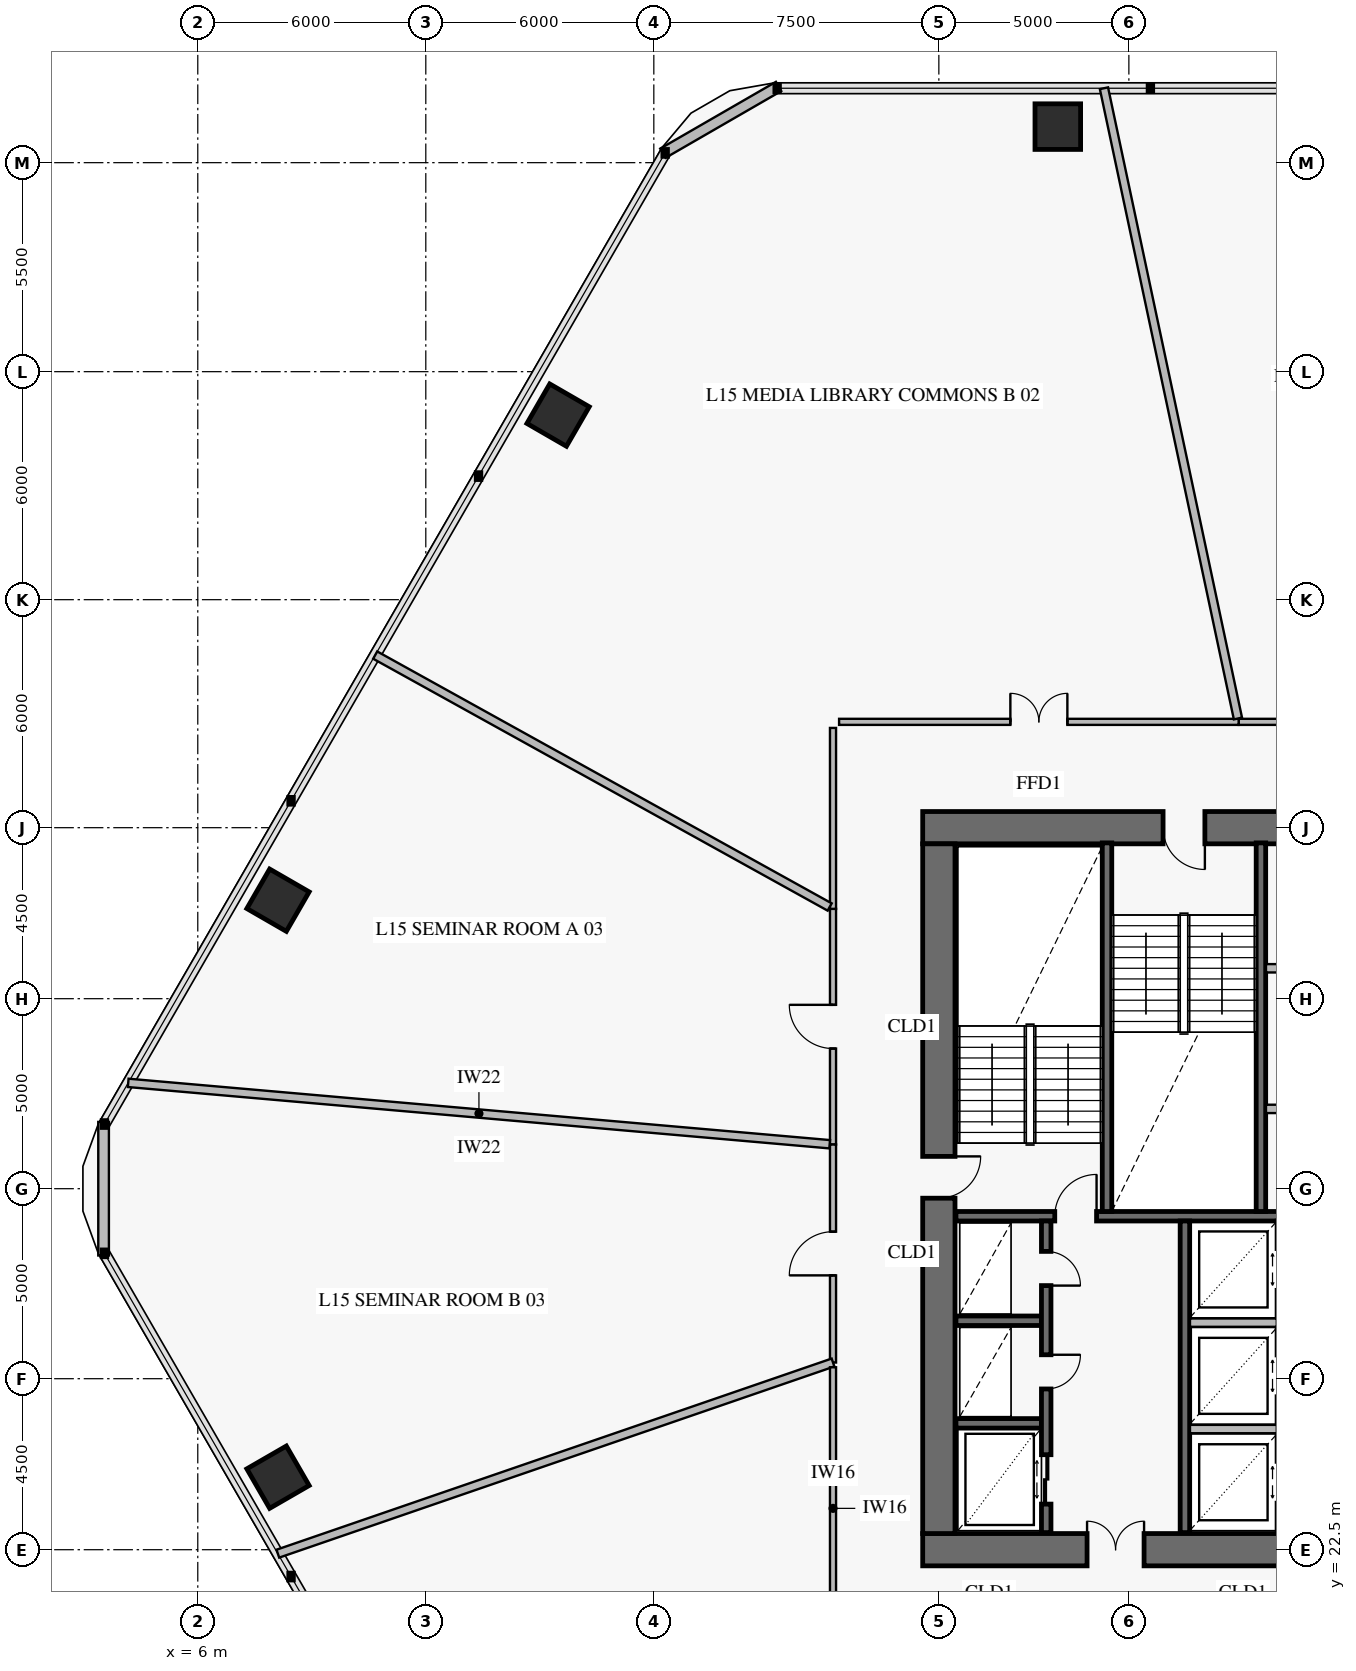
"""IFC4 building model, lengths in metres.
Left out: names, types, materials, properties, quantities, classifications, styles, units other than length and angle.
Written with IfcOpenShell. Run it as: python <this file> out.ifc"""

import sys

from ifc_helpers import new_model, si_unit, direction, frame, frame_2d, origin, origin_2d, place, context, subcontext, project, spatial, rectangle, extrude, element, fill, save


model = new_model("IFC4")
c1 = context("Model", 3, precision=1e-05, world=origin(), true_north=direction((0.0, 1.0)))
c2 = subcontext(c1, "Body", "Model", "MODEL_VIEW")
j1 = project(units=[si_unit("LENGTHUNIT", "METRE"), si_unit("PLANEANGLEUNIT", "RADIAN")], contexts=[c1])
p1 = place(None, origin())
s1 = spatial("IfcSite", under=j1, at=p1, CompositionType="ELEMENT")
p2 = place(p1, origin())
s2 = spatial("IfcBuilding", under=s1, at=p2, CompositionType="ELEMENT")
p3 = place(p2, frame((0.0, 0.0, 62.4)))
s3 = spatial("IfcBuildingStorey", under=s2, at=p3, CompositionType="ELEMENT", Elevation=62.4)
p4 = place(p3, frame((25.075, 22.5, 0.0), z_axis=(0.0, 0.0, 1.0), x_axis=(1.0, 0.0, 0.0)))
e1 = element("IfcWall", 1, at=p4, inside=s3, PredefinedType="SHEAR", context=c2, shape_type="SweptSolid", body=[
    extrude(rectangle(XDim=9.975, YDim=0.85, at=frame_2d((4.988, 0.0))), origin(), (0.0, 0.0, 1.0), 4.2),
])
p5 = place(p4, frame((4.325, 0.0, 0.0)))
e2 = element("IfcOpeningElement", 2, at=p5, cuts=e1, PredefinedType="OPENING", context=c2, shape_type="SweptSolid", body=[
    extrude(rectangle(XDim=1.5, YDim=2.15, at=frame_2d((0.75, 1.075))), frame((0.0, 0.437, 0.0), z_axis=(0.0, -1.0, 0.0), x_axis=(1.0, 0.0, 0.0)), (0.0, 0.0, 1.0), 0.874),
])
p6 = place(p3, frame((36.75, 41.5, 0.0), z_axis=(0.0, 0.0, 1.0), x_axis=(-1.0, 0.0, 0.0)))
e3 = element("IfcWall", 3, at=p6, inside=s3, PredefinedType="SHEAR", context=c2, shape_type="SweptSolid", body=[
    extrude(rectangle(XDim=11.675, YDim=0.85, at=frame_2d((5.837, 0.0))), origin(), (0.0, 0.0, 1.0), 4.2),
])
p7 = place(p6, frame((4.25, 0.0, 0.0)))
e4 = element("IfcOpeningElement", 4, at=p7, cuts=e3, PredefinedType="OPENING", context=c2, shape_type="SweptSolid", body=[
    extrude(rectangle(XDim=1.1, YDim=2.15, at=frame_2d((0.55, 1.075))), frame((0.0, 0.437, 0.0), z_axis=(0.0, -1.0, 0.0), x_axis=(1.0, 0.0, 0.0)), (0.0, 0.0, 1.0), 0.874),
])
p8 = place(p3, frame((25.5, 22.925, 0.0), z_axis=(0.0, 0.0, 1.0), x_axis=(0.0, 1.0, 0.0)))
e5 = element("IfcWall", 5, at=p8, inside=s3, PredefinedType="SHEAR", context=c2, shape_type="SweptSolid", body=[
    extrude(rectangle(XDim=18.15, YDim=0.85, at=frame_2d((9.075, 0.0))), origin(), (0.0, 0.0, 1.0), 4.2),
])
p9 = place(p8, frame((8.825, 0.0, 0.0)))
e6 = element("IfcOpeningElement", 6, at=p9, cuts=e5, PredefinedType="OPENING", context=c2, shape_type="SweptSolid", body=[
    extrude(rectangle(XDim=1.1, YDim=2.15, at=frame_2d((0.55, 1.075))), frame((0.0, 0.437, 0.0), z_axis=(0.0, -1.0, 0.0), x_axis=(1.0, 0.0, 0.0)), (0.0, 0.0, 1.0), 0.874),
])
for number, where, z_axis, x_axis in (
    (7, (28.63, 59.948, 0.0), (0.0, 0.0, 1.0), (-1.0, 0.0, 0.0)),
    (8, (15.481, 52.357, 0.0), (0.0, 0.0, 1.0), (-0.5, -0.866, 0.0)),
    (9, (8.111, 39.592, 0.0), (0.0, 0.0, 1.0), (-0.5, -0.866, 0.0)),
    (10, (8.111, 24.408, 0.0), (0.0, 0.0, 1.0), (0.5, -0.866, 0.0)),
):
    element("IfcColumn", number, at=place(p3, frame(where, z_axis=z_axis, x_axis=x_axis)), inside=s3, PredefinedType="COLUMN", context=c2, shape_type="SweptSolid", body=[
        extrude(rectangle(XDim=1.2, YDim=1.2, at=origin_2d()), origin(), (0.0, 0.0, 1.0), 3.92),
    ])
p10 = place(p3, frame((3.521, 30.242, 0.0), z_axis=(0.0, 0.0, 1.0), x_axis=(0.0, 1.0, 0.0)))
e11 = element("IfcWall", 11, at=p10, inside=s3, PredefinedType="SOLIDWALL", context=c2, shape_type="SweptSolid", body=[
    extrude(rectangle(XDim=3.515, YDim=0.28, at=frame_2d((1.758, 0.0))), origin(), (0.0, 0.0, 1.0), 3.92),
])
p11 = place(p3, frame((18.239, 59.249, 0.0), z_axis=(0.0, 0.0, 1.0), x_axis=(0.866007452331, 0.500031091541, 0.0)))
e12 = element("IfcWall", 12, at=p11, inside=s3, PredefinedType="SOLIDWALL", context=c2, shape_type="SweptSolid", body=[
    extrude(rectangle(XDim=3.515, YDim=0.28, at=frame_2d((1.757, 0.0))), origin(), (0.0, 0.0, 1.0), 3.92),
])
p12 = place(p3, frame((25.95, 31.275, 0.0), z_axis=(0.0, 0.0, 1.0), x_axis=(1.0, 0.0, 0.0)))
e13 = element("IfcWall", 13, at=p12, inside=s3, PredefinedType="SOLIDWALL", context=c2, shape_type="SweptSolid", body=[
    extrude(rectangle(XDim=20.1, YDim=0.25, at=frame_2d((10.05, 0.0))), origin(), (0.0, 0.0, 1.0), 4.2),
])
p13 = place(p12, frame((2.6, 0.0, 0.0)))
e14 = element("IfcOpeningElement", 14, at=p13, cuts=e13, PredefinedType="OPENING", context=c2, shape_type="SweptSolid", body=[
    extrude(rectangle(XDim=1.1, YDim=2.15, at=frame_2d((0.55, 1.075))), frame((0.0, 0.137, 0.0), z_axis=(0.0, -1.0, 0.0), x_axis=(1.0, 0.0, 0.0)), (0.0, 0.0, 1.0), 0.274),
])
p14 = place(p12, frame((10.6, 0.0, 0.0)))
e15 = element("IfcOpeningElement", 15, at=p14, cuts=e13, PredefinedType="OPENING", context=c2, shape_type="SweptSolid", body=[
    extrude(rectangle(XDim=1.1, YDim=2.15, at=frame_2d((0.55, 1.075))), frame((0.0, 0.137, 0.0), z_axis=(0.0, -1.0, 0.0), x_axis=(1.0, 0.0, 0.0)), (0.0, 0.0, 1.0), 0.274),
])
p15 = place(p12, frame((16.35, 0.0, 0.0)))
e16 = element("IfcOpeningElement", 16, at=p15, cuts=e13, PredefinedType="OPENING", context=c2, shape_type="SweptSolid", body=[
    extrude(rectangle(XDim=1.1, YDim=2.15, at=frame_2d((0.55, 1.075))), frame((0.0, 0.137, 0.0), z_axis=(0.0, -1.0, 0.0), x_axis=(1.0, 0.0, 0.0)), (0.0, 0.0, 1.0), 0.274),
])
for number, where, z_axis, x_axis in (
    (17, (29.925, 31.4, 0.0), (0.0, 0.0, 1.0), (0.0, 1.0, 0.0)),
    (18, (33.975, 31.4, 0.0), (0.0, 0.0, 1.0), (0.0, 1.0, 0.0)),
):
    element("IfcWall", number, at=place(p3, frame(where, z_axis=z_axis, x_axis=x_axis)), inside=s3, PredefinedType="SOLIDWALL", context=c2, shape_type="SweptSolid", body=[
        extrude(rectangle(XDim=9.7, YDim=0.25, at=frame_2d((4.85, 0.0))), origin(), (0.0, 0.0, 1.0), 4.2),
    ])
for number, where, z_axis, x_axis in (
    (19, (25.95, 25.825, 0.0), (0.0, 0.0, 1.0), (1.0, 0.0, 0.0)),
    (20, (25.95, 28.525, 0.0), (0.0, 0.0, 1.0), (1.0, 0.0, 0.0)),
):
    element("IfcWall", number, at=place(p3, frame(where, z_axis=z_axis, x_axis=x_axis)), inside=s3, PredefinedType="SOLIDWALL", context=c2, shape_type="SweptSolid", body=[
        extrude(rectangle(XDim=2.25, YDim=0.25, at=frame_2d((1.125, 0.0))), origin(), (0.0, 0.0, 1.0), 4.2),
    ])
p16 = place(p3, frame((28.325, 22.95, 0.0), z_axis=(0.0, 0.0, 1.0), x_axis=(0.0, 1.0, 0.0)))
e21 = element("IfcWall", 21, at=p16, inside=s3, PredefinedType="SOLIDWALL", context=c2, shape_type="SweptSolid", body=[
    extrude(rectangle(XDim=8.2, YDim=0.25, at=frame_2d((4.1, 0.0))), origin(), (0.0, 0.0, 1.0), 4.2),
])
p17 = place(p16, frame((0.75, 0.0, 0.0)))
e22 = element("IfcOpeningElement", 22, at=p17, cuts=e21, PredefinedType="OPENING", context=c2, shape_type="SweptSolid", body=[
    extrude(rectangle(XDim=1.3, YDim=2.3, at=frame_2d((0.65, 1.15))), frame((0.0, 0.137, 0.0), z_axis=(0.0, -1.0, 0.0), x_axis=(1.0, 0.0, 0.0)), (0.0, 0.0, 1.0), 0.274),
])
p18 = place(p16, frame((3.78, 0.0, 0.0)))
e23 = element("IfcOpeningElement", 23, at=p18, cuts=e21, PredefinedType="OPENING", context=c2, shape_type="SweptSolid", body=[
    extrude(rectangle(XDim=0.9, YDim=2.1, at=frame_2d((0.45, 1.05))), frame((0.0, 0.137, 0.0), z_axis=(0.0, -1.0, 0.0), x_axis=(1.0, 0.0, 0.0)), (0.0, 0.0, 1.0), 0.274),
])
p19 = place(p16, frame((6.5, 0.0, 0.0)))
e24 = element("IfcOpeningElement", 24, at=p19, cuts=e21, PredefinedType="OPENING", context=c2, shape_type="SweptSolid", body=[
    extrude(rectangle(XDim=0.9, YDim=2.1, at=frame_2d((0.45, 1.05))), frame((0.0, 0.137, 0.0), z_axis=(0.0, -1.0, 0.0), x_axis=(1.0, 0.0, 0.0)), (0.0, 0.0, 1.0), 0.274),
])
p20 = place(p3, frame((31.975, 22.95, 0.0), z_axis=(0.0, 0.0, 1.0), x_axis=(0.0, 1.0, 0.0)))
e25 = element("IfcWall", 25, at=p20, inside=s3, PredefinedType="SOLIDWALL", context=c2, shape_type="SweptSolid", body=[
    extrude(rectangle(XDim=8.2, YDim=0.25, at=frame_2d((4.1, 0.0))), origin(), (0.0, 0.0, 1.0), 4.2),
])
p21 = place(p3, frame((45.257, 44.285, 0.0), z_axis=(0.0, 0.0, 1.0), x_axis=(-1.0, 0.0, 0.0)))
e26 = element("IfcWall", 26, at=p21, inside=s3, PredefinedType="PARTITIONING", context=c2, shape_type="SweptSolid", body=[
    extrude(rectangle(XDim=11.869, YDim=0.16, at=frame_2d((5.934, 0.0))), origin(), (0.0, 0.0, 1.0), 3.22),
])
p22 = place(p21, frame((5.184, 0.0, 0.0)))
e27 = element("IfcOpeningElement", 27, at=p22, cuts=e26, PredefinedType="OPENING", context=c2, shape_type="SweptSolid", body=[
    extrude(rectangle(XDim=1.5, YDim=2.15, at=frame_2d((0.75, 1.075))), frame((0.0, 0.092, 0.0), z_axis=(0.0, -1.0, 0.0), x_axis=(1.0, 0.0, 0.0)), (0.0, 0.0, 1.0), 0.184),
])
p23 = place(p3, frame((33.389, 44.285, 0.0), z_axis=(0.0, 0.0, 1.0), x_axis=(-1.0, 0.0, 0.0)))
e28 = element("IfcWall", 28, at=p23, inside=s3, PredefinedType="PARTITIONING", context=c2, shape_type="SweptSolid", body=[
    extrude(rectangle(XDim=10.514, YDim=0.16, at=frame_2d((5.257, 0.0))), origin(), (0.0, 0.0, 1.0), 3.22),
])
p24 = place(p23, frame((4.507, 0.0, 0.0)))
e29 = element("IfcOpeningElement", 29, at=p24, cuts=e28, PredefinedType="OPENING", context=c2, shape_type="SweptSolid", body=[
    extrude(rectangle(XDim=1.5, YDim=2.15, at=frame_2d((0.75, 1.075))), frame((0.0, 0.092, 0.0), z_axis=(0.0, -1.0, 0.0), x_axis=(1.0, 0.0, 0.0)), (0.0, 0.0, 1.0), 0.184),
])
p25 = place(p3, frame((22.715, 39.364, 0.0), z_axis=(0.0, 0.0, 1.0), x_axis=(0.0, -1.0, 0.0)))
e30 = element("IfcWall", 30, at=p25, inside=s3, PredefinedType="PARTITIONING", context=c2, shape_type="SweptSolid", body=[
    extrude(rectangle(XDim=6.202, YDim=0.16, at=frame_2d((3.101, 0.0))), origin(), (0.0, 0.0, 1.0), 3.22),
])
p26 = place(p25, frame((2.526, 0.0, 0.0)))
e31 = element("IfcOpeningElement", 31, at=p26, cuts=e30, PredefinedType="OPENING", context=c2, shape_type="SweptSolid", body=[
    extrude(rectangle(XDim=1.15, YDim=2.2, at=frame_2d((0.575, 1.1))), frame((0.0, 0.092, 0.0), z_axis=(0.0, -1.0, 0.0), x_axis=(1.0, 0.0, 0.0)), (0.0, 0.0, 1.0), 0.184),
])
p27 = place(p3, frame((22.715, 33.162, 0.0), z_axis=(0.0, 0.0, 1.0), x_axis=(0.0, -1.0, 0.0)))
e32 = element("IfcWall", 32, at=p27, inside=s3, PredefinedType="PARTITIONING", context=c2, shape_type="SweptSolid", body=[
    extrude(rectangle(XDim=5.737, YDim=0.16, at=frame_2d((2.868, 0.0))), origin(), (0.0, 0.0, 1.0), 3.22),
])
p28 = place(p27, frame((2.293, 0.0, 0.0)))
e33 = element("IfcOpeningElement", 33, at=p28, cuts=e32, PredefinedType="OPENING", context=c2, shape_type="SweptSolid", body=[
    extrude(rectangle(XDim=1.15, YDim=2.2, at=frame_2d((0.575, 1.1))), frame((0.0, 0.092, 0.0), z_axis=(0.0, -1.0, 0.0), x_axis=(1.0, 0.0, 0.0)), (0.0, 0.0, 1.0), 0.184),
])
for number, where, z_axis, x_axis in (
    (34, (34.108, 34.1, 0.0), (0.0, 0.0, 1.0), (1.0, 0.0, 0.0)),
    (35, (34.108, 37.8, 0.0), (0.0, 0.0, 1.0), (1.0, 0.0, 0.0)),
):
    element("IfcWall", number, at=place(p3, frame(where, z_axis=z_axis, x_axis=x_axis)), inside=s3, PredefinedType="PARTITIONING", context=c2, shape_type="SweptSolid", body=[
        extrude(rectangle(XDim=2.084, YDim=0.22, at=frame_2d((1.042, 0.0))), origin(), (0.0, 0.0, 1.0), 3.92),
    ])
for number, where, z_axis, x_axis in (
    (36, (32.108, 25.675, 0.0), (0.0, 0.0, 1.0), (1.0, 0.0, 0.0)),
    (37, (32.108, 28.475, 0.0), (0.0, 0.0, 1.0), (1.0, 0.0, 0.0)),
):
    element("IfcWall", number, at=place(p3, frame(where, z_axis=z_axis, x_axis=x_axis)), inside=s3, PredefinedType="PARTITIONING", context=c2, shape_type="SweptSolid", body=[
        extrude(rectangle(XDim=2.284, YDim=0.22, at=frame_2d((1.142, 0.0))), origin(), (0.0, 0.0, 1.0), 3.92),
    ])
p29 = place(p3, frame((33.37, 44.373, 0.0), z_axis=(0.0, 0.0, 1.0), x_axis=(-0.207914205497, 0.978147066219, 0.0)))
e38 = element("IfcWall", 38, at=p29, inside=s3, PredefinedType="PARTITIONING", context=c2, shape_type="SweptSolid", body=[
    extrude(rectangle(XDim=16.956, YDim=0.22, at=frame_2d((8.478, 0.0))), origin(), (0.0, 0.0, 1.0), 3.17),
])
p30 = place(p3, frame((22.715, 44.125, 0.0), z_axis=(0.0, 0.0, 1.0), x_axis=(0.0, -1.0, 0.0)))
e39 = element("IfcWall", 39, at=p30, inside=s3, PredefinedType="PARTITIONING", context=c2, shape_type="SweptSolid", body=[
    extrude(rectangle(XDim=4.761, YDim=0.16, at=frame_2d((2.38, 0.0))), origin(), (0.0, 0.0, 1.0), 3.92),
])
p31 = place(p3, frame((22.627, 39.413, 0.0), z_axis=(0.0, 0.0, 1.0), x_axis=(-0.874620963666, 0.484807353405, 0.0)))
e40 = element("IfcWall", 40, at=p31, inside=s3, PredefinedType="PARTITIONING", context=c2, shape_type="SweptSolid", body=[
    extrude(rectangle(XDim=13.673, YDim=0.22, at=frame_2d((6.836, 0.0))), origin(), (0.0, 0.0, 1.0), 3.17),
])
p32 = place(p3, frame((22.627, 33.17, 0.0), z_axis=(0.0, 0.0, 1.0), x_axis=(-0.99619391773, 0.087164661858, 0.0)))
e41 = element("IfcWall", 41, at=p32, inside=s3, PredefinedType="PARTITIONING", context=c2, shape_type="SweptSolid", body=[
    extrude(rectangle(XDim=18.528, YDim=0.22, at=frame_2d((9.264, 0.0))), origin(), (0.0, 0.0, 1.0), 3.17),
])
p33 = place(p3, frame((22.715, 27.426, 0.0), z_axis=(0.0, 0.0, 1.0), x_axis=(-0.945519485553, -0.325565511746, 0.0)))
e42 = element("IfcWall", 42, at=p33, inside=s3, PredefinedType="PARTITIONING", context=c2, shape_type="SweptSolid", body=[
    extrude(rectangle(XDim=15.45, YDim=0.22, at=frame_2d((7.725, 0.0))), origin(), (0.0, 0.0, 1.0), 3.17),
])
p34 = place(p3, frame((22.715, 27.301, 0.0), z_axis=(0.0, 0.0, 1.0), x_axis=(0.0, -1.0, 0.0)))
e43 = element("IfcWall", 43, at=p34, inside=s3, PredefinedType="PARTITIONING", context=c2, shape_type="SweptSolid", body=[
    extrude(rectangle(XDim=7.426, YDim=0.16, at=frame_2d((3.713, 0.0))), origin(), (0.0, 0.0, 1.0), 3.92),
])
p35 = place(p9, frame((1.1, 0.0, 0.0), z_axis=(0.0, 0.0, 1.0), x_axis=(-1.0, 0.0, 0.0)))
e44 = element("IfcDoor", 44, at=p35, inside=s3, OperationType="SINGLE_SWING_LEFT", PredefinedType="USERDEFINED", context=c2, shape_type="SweptSolid", body=[
    extrude(rectangle(XDim=1.1, YDim=2.15, at=frame_2d((0.55, 1.075))), frame((0.0, 0.025, 0.0), z_axis=(0.0, -1.0, 0.0), x_axis=(1.0, 0.0, 0.0)), (0.0, 0.0, 1.0), 0.05),
])
fill(e6, e44)
p36 = place(p7, origin())
e45 = element("IfcDoor", 45, at=p36, inside=s3, OperationType="SINGLE_SWING_LEFT", PredefinedType="USERDEFINED", context=c2, shape_type="SweptSolid", body=[
    extrude(rectangle(XDim=1.1, YDim=2.15, at=frame_2d((0.55, 1.075))), frame((0.0, 0.025, 0.0), z_axis=(0.0, -1.0, 0.0), x_axis=(1.0, 0.0, 0.0)), (0.0, 0.0, 1.0), 0.05),
])
fill(e4, e45)
p37 = place(p5, origin())
e46 = element("IfcDoor", 46, at=p37, inside=s3, OperationType="DOUBLE_DOOR_SINGLE_SWING", PredefinedType="DOOR", context=c2, shape_type="SweptSolid", body=[
    extrude(rectangle(XDim=1.5, YDim=2.15, at=frame_2d((0.75, 1.075))), frame((0.0, 0.025, 0.0), z_axis=(0.0, -1.0, 0.0), x_axis=(1.0, 0.0, 0.0)), (0.0, 0.0, 1.0), 0.05),
])
fill(e2, e46)
p38 = place(p13, origin())
e47 = element("IfcDoor", 47, at=p38, inside=s3, OperationType="SINGLE_SWING_RIGHT", PredefinedType="USERDEFINED", context=c2, shape_type="SweptSolid", body=[
    extrude(rectangle(XDim=1.1, YDim=2.15, at=frame_2d((0.55, 1.075))), frame((0.0, 0.025, 0.0), z_axis=(0.0, -1.0, 0.0), x_axis=(1.0, 0.0, 0.0)), (0.0, 0.0, 1.0), 0.05),
])
fill(e14, e47)
p39 = place(p17, frame((1.3, 0.0, 0.0), z_axis=(0.0, 0.0, 1.0), x_axis=(-1.0, 0.0, 0.0)))
e48 = element("IfcDoor", 48, at=p39, inside=s3, OperationType="DOUBLE_DOOR_SLIDING", PredefinedType="DOOR", context=c2, shape_type="SweptSolid", body=[
    extrude(rectangle(XDim=1.3, YDim=2.3, at=frame_2d((0.65, 1.15))), frame((0.0, 0.025, 0.0), z_axis=(0.0, -1.0, 0.0), x_axis=(1.0, 0.0, 0.0)), (0.0, 0.0, 1.0), 0.05),
])
fill(e22, e48)
p40 = place(p18, frame((0.9, 0.0, 0.0), z_axis=(0.0, 0.0, 1.0), x_axis=(-1.0, 0.0, 0.0)))
e49 = element("IfcDoor", 49, at=p40, inside=s3, OperationType="SINGLE_SWING_LEFT", PredefinedType="DOOR", context=c2, shape_type="SweptSolid", body=[
    extrude(rectangle(XDim=0.9, YDim=2.1, at=frame_2d((0.45, 1.05))), frame((0.0, 0.025, 0.0), z_axis=(0.0, -1.0, 0.0), x_axis=(1.0, 0.0, 0.0)), (0.0, 0.0, 1.0), 0.05),
])
fill(e23, e49)
p41 = place(p19, frame((0.9, 0.0, 0.0), z_axis=(0.0, 0.0, 1.0), x_axis=(-1.0, 0.0, 0.0)))
e50 = element("IfcDoor", 50, at=p41, inside=s3, OperationType="SINGLE_SWING_RIGHT", PredefinedType="DOOR", context=c2, shape_type="SweptSolid", body=[
    extrude(rectangle(XDim=0.9, YDim=2.1, at=frame_2d((0.45, 1.05))), frame((0.0, 0.025, 0.0), z_axis=(0.0, -1.0, 0.0), x_axis=(1.0, 0.0, 0.0)), (0.0, 0.0, 1.0), 0.05),
])
fill(e24, e50)
p42 = place(p24, frame((1.5, 0.0, 0.0), z_axis=(0.0, 0.0, 1.0), x_axis=(-1.0, 0.0, 0.0)))
e51 = element("IfcDoor", 51, at=p42, inside=s3, OperationType="DOUBLE_DOOR_SINGLE_SWING", PredefinedType="DOOR", context=c2, shape_type="SweptSolid", body=[
    extrude(rectangle(XDim=1.5, YDim=2.15, at=frame_2d((0.75, 1.075))), frame((0.0, 0.025, 0.0), z_axis=(0.0, -1.0, 0.0), x_axis=(1.0, 0.0, 0.0)), (0.0, 0.0, 1.0), 0.05),
])
fill(e29, e51)
p43 = place(p26, frame((1.15, 0.0, 0.0), z_axis=(0.0, 0.0, 1.0), x_axis=(-1.0, 0.0, 0.0)))
e52 = element("IfcDoor", 52, at=p43, inside=s3, OperationType="SINGLE_SWING_RIGHT", PredefinedType="DOOR", context=c2, shape_type="SweptSolid", body=[
    extrude(rectangle(XDim=1.15, YDim=2.2, at=frame_2d((0.575, 1.1))), frame((0.0, 0.025, 0.0), z_axis=(0.0, -1.0, 0.0), x_axis=(1.0, 0.0, 0.0)), (0.0, 0.0, 1.0), 0.05),
])
fill(e31, e52)
p44 = place(p28, frame((1.15, 0.0, 0.0), z_axis=(0.0, 0.0, 1.0), x_axis=(-1.0, 0.0, 0.0)))
e53 = element("IfcDoor", 53, at=p44, inside=s3, OperationType="SINGLE_SWING_LEFT", PredefinedType="DOOR", context=c2, shape_type="SweptSolid", body=[
    extrude(rectangle(XDim=1.15, YDim=2.2, at=frame_2d((0.575, 1.1))), frame((0.0, 0.025, 0.0), z_axis=(0.0, -1.0, 0.0), x_axis=(1.0, 0.0, 0.0)), (0.0, 0.0, 1.0), 0.05),
])
fill(e33, e53)
save(model, sys.argv[1])
